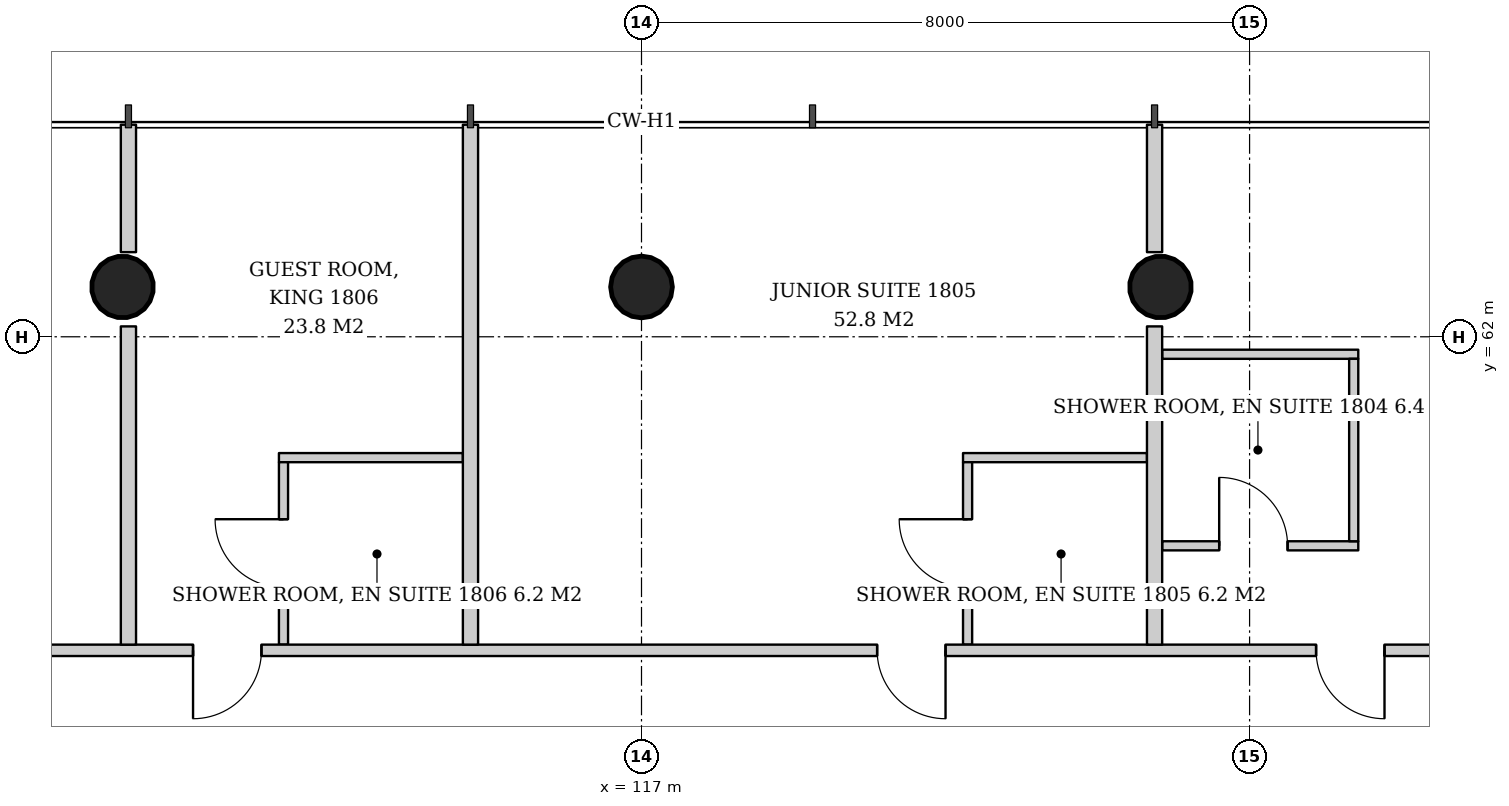
"""IFC4 building model, lengths in metres.
Left out: names, types, materials, properties, quantities, classifications, styles, units other than length and angle.
Written with IfcOpenShell. Run it as: python <this file> out.ifc"""

import sys

from ifc_helpers import new_model, si_unit, direction, frame, frame_2d, origin, origin_2d, place, context, subcontext, project, spatial, rectangle, hollow_circle, extrude, element, fill, save


model = new_model("IFC4")
c1 = context("Model", 3, precision=1e-05, world=origin(), true_north=direction((0.0, 1.0)))
c2 = subcontext(c1, "Body", "Model", "MODEL_VIEW")
j1 = project(units=[si_unit("LENGTHUNIT", "METRE"), si_unit("PLANEANGLEUNIT", "RADIAN")], contexts=[c1])
p1 = place(None, origin())
s1 = spatial("IfcSite", under=j1, at=p1, CompositionType="ELEMENT")
p2 = place(p1, origin())
s2 = spatial("IfcBuilding", under=s1, at=p2, CompositionType="ELEMENT")
p3 = place(p2, frame((0.0, 0.0, 74.2)))
s3 = spatial("IfcBuildingStorey", under=s2, at=p3, CompositionType="ELEMENT", Elevation=74.2)
p4 = place(p3, frame((123.854, 62.707, 0.0), z_axis=(-0.021561908287, -0.042995471882, 0.998842566929), x_axis=(0.89389288677, -0.448280611873, 0.0)))
e1 = element("IfcColumn", 1, at=p4, inside=s3, PredefinedType="COLUMN", context=c2, shape_type="SweptSolid", body=[
    extrude(hollow_circle(Radius=0.406, WallThickness=0.03, at=origin_2d()), origin(), (0.0, 0.0, 1.0), 3.804),
])
p5 = place(p3, frame((117.0, 62.707, 0.0), z_axis=(0.0, -0.043005470007, 0.999074836811), x_axis=(1.0, 0.0, 0.0)))
e2 = element("IfcColumn", 2, at=p5, inside=s3, PredefinedType="COLUMN", context=c2, shape_type="SweptSolid", body=[
    extrude(hollow_circle(Radius=0.406, WallThickness=0.03, at=origin_2d()), origin(), (0.0, 0.0, 1.0), 3.803),
])
p6 = place(p3, frame((110.146, 62.707, 0.0), z_axis=(0.021561908287, -0.042995471882, 0.998842566929), x_axis=(0.89389288677, 0.448280611873, 0.0)))
e3 = element("IfcColumn", 3, at=p6, inside=s3, PredefinedType="COLUMN", context=c2, shape_type="SweptSolid", body=[
    extrude(hollow_circle(Radius=0.406, WallThickness=0.03, at=origin_2d()), origin(), (0.0, 0.0, 1.0), 3.804),
])
p7 = place(p3, frame((123.85, 59.25, 0.0), z_axis=(0.0, 0.0, 1.0), x_axis=(1.0, 0.0, 0.0)))
e4 = element("IfcWall", 4, at=p7, inside=s3, PredefinedType="PARTITIONING", context=c2, shape_type="SweptSolid", body=[
    extrude(rectangle(XDim=2.58, YDim=0.12, at=frame_2d((1.29, 0.0))), origin(), (0.0, 0.0, 1.0), 2.8),
])
p8 = place(p7, frame((0.75, 0.0, 0.0)))
e5 = element("IfcOpeningElement", 5, at=p8, cuts=e4, PredefinedType="OPENING", context=c2, shape_type="SweptSolid", body=[
    extrude(rectangle(XDim=0.9, YDim=2.1, at=frame_2d((0.45, 1.05))), frame((0.0, 0.07, 0.0), z_axis=(0.0, -1.0, 0.0), x_axis=(1.0, 0.0, 0.0)), (0.0, 0.0, 1.0), 0.14),
])
p9 = place(p3, frame((123.85, 61.77, 0.0), z_axis=(0.0, 0.0, 1.0), x_axis=(1.0, 0.0, 0.0)))
e6 = element("IfcWall", 6, at=p9, inside=s3, PredefinedType="PARTITIONING", context=c2, shape_type="SweptSolid", body=[
    extrude(rectangle(XDim=2.58, YDim=0.12, at=frame_2d((1.29, 0.0))), origin(), (0.0, 0.0, 1.0), 2.8),
])
p10 = place(p3, frame((126.37, 59.31, 0.0), z_axis=(0.0, 0.0, 1.0), x_axis=(0.0, 1.0, 0.0)))
e7 = element("IfcWall", 7, at=p10, inside=s3, PredefinedType="PARTITIONING", context=c2, shape_type="SweptSolid", body=[
    extrude(rectangle(XDim=2.4, YDim=0.12, at=frame_2d((1.2, 0.0))), origin(), (0.0, 0.0, 1.0), 2.8),
])
p11 = place(p3, frame((123.65, 60.41, 0.0), z_axis=(0.0, 0.0, 1.0), x_axis=(-1.0, 0.0, 0.0)))
e8 = element("IfcWall", 8, at=p11, inside=s3, PredefinedType="PARTITIONING", context=c2, shape_type="SweptSolid", body=[
    extrude(rectangle(XDim=2.42, YDim=0.12, at=frame_2d((1.21, 0.0))), origin(), (0.0, 0.0, 1.0), 2.847),
])
p12 = place(p3, frame((121.29, 57.95, 0.0), z_axis=(0.0, 0.0, 1.0), x_axis=(0.0, 1.0, 0.0)))
e9 = element("IfcWall", 9, at=p12, inside=s3, PredefinedType="PARTITIONING", context=c2, shape_type="SweptSolid", body=[
    extrude(rectangle(XDim=2.4, YDim=0.12, at=frame_2d((1.2, 0.0))), origin(), (0.0, 0.0, 1.0), 3.6),
])
p13 = place(p12, frame((0.75, 0.0, 0.0)))
e10 = element("IfcOpeningElement", 10, at=p13, cuts=e9, PredefinedType="OPENING", context=c2, shape_type="SweptSolid", body=[
    extrude(rectangle(XDim=0.9, YDim=2.1, at=frame_2d((0.45, 1.05))), frame((0.0, 0.07, 0.0), z_axis=(0.0, -1.0, 0.0), x_axis=(1.0, 0.0, 0.0)), (0.0, 0.0, 1.0), 0.14),
])
p14 = place(p3, frame((114.65, 60.41, 0.0), z_axis=(0.0, 0.0, 1.0), x_axis=(-1.0, 0.0, 0.0)))
e11 = element("IfcWall", 11, at=p14, inside=s3, PredefinedType="PARTITIONING", context=c2, shape_type="SweptSolid", body=[
    extrude(rectangle(XDim=2.42, YDim=0.12, at=frame_2d((1.21, 0.0))), origin(), (0.0, 0.0, 1.0), 2.847),
])
p15 = place(p3, frame((112.29, 57.95, 0.0), z_axis=(0.0, 0.0, 1.0), x_axis=(0.0, 1.0, 0.0)))
e12 = element("IfcWall", 12, at=p15, inside=s3, PredefinedType="PARTITIONING", context=c2, shape_type="SweptSolid", body=[
    extrude(rectangle(XDim=2.4, YDim=0.12, at=frame_2d((1.2, 0.0))), origin(), (0.0, 0.0, 1.0), 3.6),
])
p16 = place(p15, frame((0.75, 0.0, 0.0)))
e13 = element("IfcOpeningElement", 13, at=p16, cuts=e12, PredefinedType="OPENING", context=c2, shape_type="SweptSolid", body=[
    extrude(rectangle(XDim=0.9, YDim=2.1, at=frame_2d((0.45, 1.05))), frame((0.0, 0.07, 0.0), z_axis=(0.0, -1.0, 0.0), x_axis=(1.0, 0.0, 0.0)), (0.0, 0.0, 1.0), 0.14),
])
p17 = place(p3, frame((128.95, 57.875, 0.0), z_axis=(0.0, 0.0, 1.0), x_axis=(-1.0, 0.0, 0.0)))
e14 = element("IfcWall", 14, at=p17, inside=s3, PredefinedType="PARTITIONING", context=c2, shape_type="SweptSolid", body=[
    extrude(rectangle(XDim=23.75, YDim=0.15, at=frame_2d((11.875, 0.0))), origin(), (0.0, 0.0, 1.0), 2.8),
])
p18 = place(p17, frame((2.175, 0.0, 0.0)))
e15 = element("IfcOpeningElement", 15, at=p18, cuts=e14, PredefinedType="OPENING", context=c2, shape_type="SweptSolid", body=[
    extrude(rectangle(XDim=0.9, YDim=2.1, at=frame_2d((0.45, 1.05))), frame((0.0, 0.085, 0.0), z_axis=(0.0, -1.0, 0.0), x_axis=(1.0, 0.0, 0.0)), (0.0, 0.0, 1.0), 0.17),
])
p19 = place(p17, frame((7.95, 0.0, 0.0)))
e16 = element("IfcOpeningElement", 16, at=p19, cuts=e14, PredefinedType="OPENING", context=c2, shape_type="SweptSolid", body=[
    extrude(rectangle(XDim=0.9, YDim=2.1, at=frame_2d((0.45, 1.05))), frame((0.0, 0.085, 0.0), z_axis=(0.0, -1.0, 0.0), x_axis=(1.0, 0.0, 0.0)), (0.0, 0.0, 1.0), 0.17),
])
p20 = place(p17, frame((16.95, 0.0, 0.0)))
e17 = element("IfcOpeningElement", 17, at=p20, cuts=e14, PredefinedType="OPENING", context=c2, shape_type="SweptSolid", body=[
    extrude(rectangle(XDim=0.9, YDim=2.1, at=frame_2d((0.45, 1.05))), frame((0.0, 0.085, 0.0), z_axis=(0.0, -1.0, 0.0), x_axis=(1.0, 0.0, 0.0)), (0.0, 0.0, 1.0), 0.17),
])
p21 = place(p3, frame((123.75, 57.95, 0.0), z_axis=(0.0, 0.0, 1.0), x_axis=(0.0, 1.0, 0.0)))
e18 = element("IfcWall", 18, at=p21, inside=s3, PredefinedType="PARTITIONING", context=c2, shape_type="SweptSolid", body=[
    extrude(rectangle(XDim=4.187, YDim=0.2, at=frame_2d((2.093, 0.0))), origin(), (0.0, 0.0, 1.0), 3.6),
])
p22 = place(p3, frame((123.75, 63.113, 0.0), z_axis=(0.0, 0.0, 1.0), x_axis=(0.0, 1.0, 0.0)))
e19 = element("IfcWall", 19, at=p22, inside=s3, PredefinedType="PARTITIONING", context=c2, shape_type="SweptSolid", body=[
    extrude(rectangle(XDim=1.677, YDim=0.2, at=frame_2d((0.838, 0.0))), origin(), (0.0, 0.0, 1.0), 3.6),
])
p23 = place(p3, frame((114.75, 57.95, 0.0), z_axis=(0.0, 0.0, 1.0), x_axis=(0.0, 1.0, 0.0)))
e20 = element("IfcWall", 20, at=p23, inside=s3, PredefinedType="PARTITIONING", context=c2, shape_type="SweptSolid", body=[
    extrude(rectangle(XDim=6.84, YDim=0.2, at=frame_2d((3.42, 0.0))), origin(), (0.0, 0.0, 1.0), 3.05),
])
p24 = place(p3, frame((110.25, 57.95, 0.0), z_axis=(0.0, 0.0, 1.0), x_axis=(0.0, 1.0, 0.0)))
e21 = element("IfcWall", 21, at=p24, inside=s3, PredefinedType="PARTITIONING", context=c2, shape_type="SweptSolid", body=[
    extrude(rectangle(XDim=4.187, YDim=0.2, at=frame_2d((2.093, 0.0))), origin(), (0.0, 0.0, 1.0), 3.6),
])
p25 = place(p3, frame((110.25, 63.113, 0.0), z_axis=(0.0, 0.0, 1.0), x_axis=(0.0, 1.0, 0.0)))
e22 = element("IfcWall", 22, at=p25, inside=s3, PredefinedType="PARTITIONING", context=c2, shape_type="SweptSolid", body=[
    extrude(rectangle(XDim=1.677, YDim=0.2, at=frame_2d((0.838, 0.0))), origin(), (0.0, 0.0, 1.0), 3.6),
])
p26 = place(p8, origin())
e23 = element("IfcDoor", 23, at=p26, inside=s3, OperationType="SINGLE_SWING_LEFT", PredefinedType="DOOR", context=c2, shape_type="SweptSolid", body=[
    extrude(rectangle(XDim=0.9, YDim=2.1, at=frame_2d((0.45, 1.05))), frame((0.0, 0.025, 0.0), z_axis=(0.0, -1.0, 0.0), x_axis=(1.0, 0.0, 0.0)), (0.0, 0.0, 1.0), 0.05),
])
fill(e5, e23)
p27 = place(p13, origin())
e24 = element("IfcDoor", 24, at=p27, inside=s3, OperationType="SINGLE_SWING_RIGHT", PredefinedType="DOOR", context=c2, shape_type="SweptSolid", body=[
    extrude(rectangle(XDim=0.9, YDim=2.1, at=frame_2d((0.45, 1.05))), frame((0.0, 0.025, 0.0), z_axis=(0.0, -1.0, 0.0), x_axis=(1.0, 0.0, 0.0)), (0.0, 0.0, 1.0), 0.05),
])
fill(e10, e24)
p28 = place(p16, origin())
e25 = element("IfcDoor", 25, at=p28, inside=s3, OperationType="SINGLE_SWING_RIGHT", PredefinedType="DOOR", context=c2, shape_type="SweptSolid", body=[
    extrude(rectangle(XDim=0.9, YDim=2.1, at=frame_2d((0.45, 1.05))), frame((0.0, 0.025, 0.0), z_axis=(0.0, -1.0, 0.0), x_axis=(1.0, 0.0, 0.0)), (0.0, 0.0, 1.0), 0.05),
])
fill(e13, e25)
p29 = place(p18, origin())
e26 = element("IfcDoor", 26, at=p29, inside=s3, OperationType="SINGLE_SWING_LEFT", PredefinedType="DOOR", context=c2, shape_type="SweptSolid", body=[
    extrude(rectangle(XDim=0.9, YDim=2.1, at=frame_2d((0.45, 1.05))), frame((0.0, 0.025, 0.0), z_axis=(0.0, -1.0, 0.0), x_axis=(1.0, 0.0, 0.0)), (0.0, 0.0, 1.0), 0.05),
])
fill(e15, e26)
p30 = place(p19, origin())
e27 = element("IfcDoor", 27, at=p30, inside=s3, OperationType="SINGLE_SWING_LEFT", PredefinedType="DOOR", context=c2, shape_type="SweptSolid", body=[
    extrude(rectangle(XDim=0.9, YDim=2.1, at=frame_2d((0.45, 1.05))), frame((0.0, 0.025, 0.0), z_axis=(0.0, -1.0, 0.0), x_axis=(1.0, 0.0, 0.0)), (0.0, 0.0, 1.0), 0.05),
])
fill(e16, e27)
p31 = place(p20, origin())
e28 = element("IfcDoor", 28, at=p31, inside=s3, OperationType="SINGLE_SWING_RIGHT", PredefinedType="DOOR", context=c2, shape_type="SweptSolid", body=[
    extrude(rectangle(XDim=0.9, YDim=2.1, at=frame_2d((0.45, 1.05))), frame((0.0, 0.025, 0.0), z_axis=(0.0, -1.0, 0.0), x_axis=(1.0, 0.0, 0.0)), (0.0, 0.0, 1.0), 0.05),
])
fill(e17, e28)
save(model, sys.argv[1])
